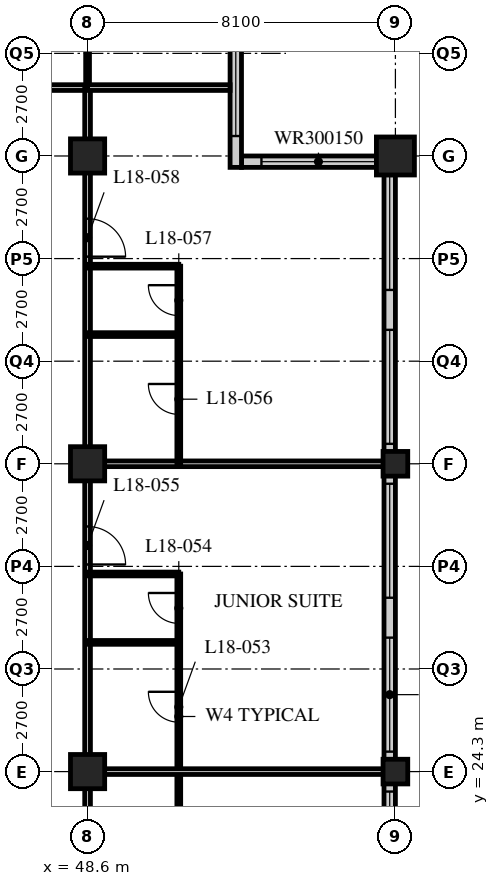
"""IFC4 building model, lengths in metres.
Left out: names, types, materials, properties, quantities, classifications, styles, units other than length and angle.
Written with IfcOpenShell. Run it as: python <this file> out.ifc"""

import sys

from ifc_helpers import new_model, si_unit, direction, frame, frame_2d, origin, origin_2d, place, context, subcontext, project, spatial, rectangle, hollow_rectangle, extrude, element, fill, save


model = new_model("IFC4")
c1 = context("Model", 3, precision=1e-05, world=origin(), true_north=direction((0.0, 1.0)))
c2 = subcontext(c1, "Body", "Model", "MODEL_VIEW")
j1 = project(units=[si_unit("LENGTHUNIT", "METRE"), si_unit("PLANEANGLEUNIT", "RADIAN")], contexts=[c1])
p1 = place(None, origin())
s1 = spatial("IfcSite", under=j1, at=p1, CompositionType="ELEMENT")
p2 = place(p1, origin())
s2 = spatial("IfcBuilding", under=s1, at=p2, CompositionType="ELEMENT")
p3 = place(p2, frame((0.0, 0.0, 73.8)))
s3 = spatial("IfcBuildingStorey", under=s2, at=p3, CompositionType="ELEMENT", Elevation=73.8)
for number, where, z_axis, x_axis in (
    (1, (48.6, 24.3, 0.0), (0.0, 0.0, 1.0), (1.0, 0.0, 0.0)),
    (2, (48.6, 32.4, 0.0), (0.0, 0.0, 1.0), (1.0, 0.0, 0.0)),
    (3, (48.6, 40.5, 0.0), (0.0, 0.0, 1.0), (1.0, 0.0, 0.0)),
):
    element("IfcColumn", number, at=place(p3, frame(where, z_axis=z_axis, x_axis=x_axis)), inside=s3, PredefinedType="COLUMN", context=c2, shape_type="SweptSolid", body=[
        extrude(hollow_rectangle(XDim=0.9, YDim=0.9, WallThickness=0.09, at=origin_2d()), origin(), (0.0, 0.0, 1.0), 3.4),
    ])
for number, where, z_axis, x_axis in (
    (4, (56.7, 24.3, 0.0), (0.0, 0.0, 1.0), (1.0, 0.0, 0.0)),
    (5, (56.7, 32.4, 0.0), (0.0, 0.0, 1.0), (1.0, 0.0, 0.0)),
):
    element("IfcColumn", number, at=place(p3, frame(where, z_axis=z_axis, x_axis=x_axis)), inside=s3, PredefinedType="COLUMN", context=c2, shape_type="SweptSolid", body=[
        extrude(hollow_rectangle(XDim=0.65, YDim=0.65, WallThickness=0.05, at=origin_2d()), origin(), (0.0, 0.0, 1.0), 3.4),
    ])
p4 = place(p3, frame((56.7, 40.5, 0.0), z_axis=(0.0, 0.0, 1.0), x_axis=(1.0, 0.0, 0.0)))
e6 = element("IfcColumn", 6, at=p4, inside=s3, PredefinedType="COLUMN", context=c2, shape_type="SweptSolid", body=[
    extrude(hollow_rectangle(XDim=1.0, YDim=1.0, WallThickness=0.1, at=origin_2d()), origin(), (0.0, 0.0, 1.0), 3.4),
])
p5 = place(p3, frame((56.55, 8.4, 0.0), z_axis=(0.0, 0.0, 1.0), x_axis=(0.0, 1.0, 0.0)))
e7 = element("IfcWall", 7, at=p5, inside=s3, PredefinedType="SOLIDWALL", context=c2, shape_type="SweptSolid", body=[
    extrude(rectangle(XDim=32.1, YDim=0.3, at=frame_2d((16.05, 0.0))), origin(), (0.0, 0.0, 1.0), 3.19),
])
p6 = place(p5, frame((0.225, 0.0, 0.9)))
e8 = element("IfcOpeningElement", 8, at=p6, cuts=e7, PredefinedType="OPENING", context=c2, shape_type="SweptSolid", body=[
    extrude(rectangle(XDim=3.0, YDim=2.0, at=frame_2d((1.5, 1.0))), frame((0.0, 0.16, 0.0), z_axis=(0.0, -1.0, 0.0), x_axis=(1.0, 0.0, 0.0)), (0.0, 0.0, 1.0), 0.32),
])
p7 = place(p5, frame((4.275, 0.0, 0.9)))
e9 = element("IfcOpeningElement", 9, at=p7, cuts=e7, PredefinedType="OPENING", context=c2, shape_type="SweptSolid", body=[
    extrude(rectangle(XDim=3.0, YDim=2.0, at=frame_2d((1.5, 1.0))), frame((0.0, 0.16, 0.0), z_axis=(0.0, -1.0, 0.0), x_axis=(1.0, 0.0, 0.0)), (0.0, 0.0, 1.0), 0.32),
])
p8 = place(p5, frame((8.325, 0.0, 0.9)))
e10 = element("IfcOpeningElement", 10, at=p8, cuts=e7, PredefinedType="OPENING", context=c2, shape_type="SweptSolid", body=[
    extrude(rectangle(XDim=3.0, YDim=2.0, at=frame_2d((1.5, 1.0))), frame((0.0, 0.16, 0.0), z_axis=(0.0, -1.0, 0.0), x_axis=(1.0, 0.0, 0.0)), (0.0, 0.0, 1.0), 0.32),
])
p9 = place(p5, frame((12.375, 0.0, 0.9)))
e11 = element("IfcOpeningElement", 11, at=p9, cuts=e7, PredefinedType="OPENING", context=c2, shape_type="SweptSolid", body=[
    extrude(rectangle(XDim=3.0, YDim=2.0, at=frame_2d((1.5, 1.0))), frame((0.0, 0.16, 0.0), z_axis=(0.0, -1.0, 0.0), x_axis=(1.0, 0.0, 0.0)), (0.0, 0.0, 1.0), 0.32),
])
p10 = place(p5, frame((16.425, 0.0, 0.9)))
e12 = element("IfcOpeningElement", 12, at=p10, cuts=e7, PredefinedType="OPENING", context=c2, shape_type="SweptSolid", body=[
    extrude(rectangle(XDim=3.0, YDim=2.0, at=frame_2d((1.5, 1.0))), frame((0.0, 0.16, 0.0), z_axis=(0.0, -1.0, 0.0), x_axis=(1.0, 0.0, 0.0)), (0.0, 0.0, 1.0), 0.32),
])
p11 = place(p5, frame((20.475, 0.0, 0.9)))
e13 = element("IfcOpeningElement", 13, at=p11, cuts=e7, PredefinedType="OPENING", context=c2, shape_type="SweptSolid", body=[
    extrude(rectangle(XDim=3.0, YDim=2.0, at=frame_2d((1.5, 1.0))), frame((0.0, 0.16, 0.0), z_axis=(0.0, -1.0, 0.0), x_axis=(1.0, 0.0, 0.0)), (0.0, 0.0, 1.0), 0.32),
])
p12 = place(p5, frame((24.525, 0.0, 0.9)))
e14 = element("IfcOpeningElement", 14, at=p12, cuts=e7, PredefinedType="OPENING", context=c2, shape_type="SweptSolid", body=[
    extrude(rectangle(XDim=3.0, YDim=2.0, at=frame_2d((1.5, 1.0))), frame((0.0, 0.16, 0.0), z_axis=(0.0, -1.0, 0.0), x_axis=(1.0, 0.0, 0.0)), (0.0, 0.0, 1.0), 0.32),
])
p13 = place(p5, frame((28.575, 0.0, 0.9)))
e15 = element("IfcOpeningElement", 15, at=p13, cuts=e7, PredefinedType="OPENING", context=c2, shape_type="SweptSolid", body=[
    extrude(rectangle(XDim=3.0, YDim=2.0, at=frame_2d((1.5, 1.0))), frame((0.0, 0.16, 0.0), z_axis=(0.0, -1.0, 0.0), x_axis=(1.0, 0.0, 0.0)), (0.0, 0.0, 1.0), 0.32),
])
p14 = place(p3, frame((56.4, 40.35, 0.0), z_axis=(0.0, 0.0, 1.0), x_axis=(-1.0, 0.0, 0.0)))
e16 = element("IfcWall", 16, at=p14, inside=s3, PredefinedType="SOLIDWALL", context=c2, shape_type="SweptSolid", body=[
    extrude(rectangle(XDim=3.75, YDim=0.3, at=frame_2d((1.875, 0.0))), origin(), (0.0, 0.0, 1.0), 3.19),
])
p15 = place(p14, frame((0.225, 0.0, 0.9)))
e17 = element("IfcOpeningElement", 17, at=p15, cuts=e16, PredefinedType="OPENING", context=c2, shape_type="SweptSolid", body=[
    extrude(rectangle(XDim=3.0, YDim=1.5, at=frame_2d((1.5, 0.75))), frame((0.0, 0.16, 0.0), z_axis=(0.0, -1.0, 0.0), x_axis=(1.0, 0.0, 0.0)), (0.0, 0.0, 1.0), 0.32),
])
p16 = place(p3, frame((52.5, 40.2, 0.0), z_axis=(0.0, 0.0, 1.0), x_axis=(0.0, 1.0, 0.0)))
e18 = element("IfcWall", 18, at=p16, inside=s3, PredefinedType="SOLIDWALL", context=c2, shape_type="SweptSolid", body=[
    extrude(rectangle(XDim=4.35, YDim=0.3, at=frame_2d((2.175, 0.0))), origin(), (0.0, 0.0, 1.0), 3.19),
])
p17 = place(p16, frame((0.825, 0.0, 0.9)))
e19 = element("IfcOpeningElement", 19, at=p17, cuts=e18, PredefinedType="OPENING", context=c2, shape_type="SweptSolid", body=[
    extrude(rectangle(XDim=3.0, YDim=1.5, at=frame_2d((1.5, 0.75))), frame((0.0, 0.16, 0.0), z_axis=(0.0, -1.0, 0.0), x_axis=(1.0, 0.0, 0.0)), (0.0, 0.0, 1.0), 0.32),
])
p18 = place(p3, frame((12.15, 42.3, 0.0), z_axis=(0.0, 0.0, 1.0), x_axis=(1.0, 0.0, 0.0)))
e20 = element("IfcWall", 20, at=p18, inside=s3, PredefinedType="PARTITIONING", context=c2, shape_type="SweptSolid", body=[
    extrude(rectangle(XDim=36.45, YDim=0.15, at=frame_2d((18.225, 0.0))), origin(), (0.0, 0.0, 1.0), 3.19),
])
p19 = place(p18, frame((9.5, 0.0, 0.0)))
e21 = element("IfcOpeningElement", 21, at=p19, cuts=e20, PredefinedType="OPENING", context=c2, shape_type="SweptSolid", body=[
    extrude(rectangle(XDim=1.0, YDim=2.1, at=frame_2d((0.5, 1.05))), frame((0.0, 0.085, 0.0), z_axis=(0.0, -1.0, 0.0), x_axis=(1.0, 0.0, 0.0)), (0.0, 0.0, 1.0), 0.17),
])
p20 = place(p18, frame((17.6, 0.0, 0.0)))
e22 = element("IfcOpeningElement", 22, at=p20, cuts=e20, PredefinedType="OPENING", context=c2, shape_type="SweptSolid", body=[
    extrude(rectangle(XDim=1.0, YDim=2.1, at=frame_2d((0.5, 1.05))), frame((0.0, 0.085, 0.0), z_axis=(0.0, -1.0, 0.0), x_axis=(1.0, 0.0, 0.0)), (0.0, 0.0, 1.0), 0.17),
])
p21 = place(p18, frame((22.7, 0.0, 0.0)))
e23 = element("IfcOpeningElement", 23, at=p21, cuts=e20, PredefinedType="OPENING", context=c2, shape_type="SweptSolid", body=[
    extrude(rectangle(XDim=1.0, YDim=2.1, at=frame_2d((0.5, 1.05))), frame((0.0, 0.085, 0.0), z_axis=(0.0, -1.0, 0.0), x_axis=(1.0, 0.0, 0.0)), (0.0, 0.0, 1.0), 0.17),
])
p22 = place(p18, frame((26.75, 0.0, 0.0)))
e24 = element("IfcOpeningElement", 24, at=p22, cuts=e20, PredefinedType="OPENING", context=c2, shape_type="SweptSolid", body=[
    extrude(rectangle(XDim=1.0, YDim=2.1, at=frame_2d((0.5, 1.05))), frame((0.0, 0.085, 0.0), z_axis=(0.0, -1.0, 0.0), x_axis=(1.0, 0.0, 0.0)), (0.0, 0.0, 1.0), 0.17),
])
p23 = place(p18, frame((30.8, 0.0, 0.0)))
e25 = element("IfcOpeningElement", 25, at=p23, cuts=e20, PredefinedType="OPENING", context=c2, shape_type="SweptSolid", body=[
    extrude(rectangle(XDim=1.0, YDim=2.1, at=frame_2d((0.5, 1.05))), frame((0.0, 0.085, 0.0), z_axis=(0.0, -1.0, 0.0), x_axis=(1.0, 0.0, 0.0)), (0.0, 0.0, 1.0), 0.17),
])
p24 = place(p18, frame((32.825, 0.0, 0.0)))
e26 = element("IfcOpeningElement", 26, at=p24, cuts=e20, PredefinedType="OPENING", context=c2, shape_type="SweptSolid", body=[
    extrude(rectangle(XDim=1.0, YDim=2.1, at=frame_2d((0.5, 1.05))), frame((0.0, 0.085, 0.0), z_axis=(0.0, -1.0, 0.0), x_axis=(1.0, 0.0, 0.0)), (0.0, 0.0, 1.0), 0.17),
])
p25 = place(p18, frame((2.625, 0.0, 0.0)))
e27 = element("IfcOpeningElement", 27, at=p25, cuts=e20, PredefinedType="OPENING", context=c2, shape_type="SweptSolid", body=[
    extrude(rectangle(XDim=1.0, YDim=2.1, at=frame_2d((0.5, 1.05))), frame((0.0, 0.085, 0.0), z_axis=(0.0, -1.0, 0.0), x_axis=(1.0, 0.0, 0.0)), (0.0, 0.0, 1.0), 0.17),
])
p26 = place(p3, frame((48.6, 16.2, 0.0), z_axis=(0.0, 0.0, 1.0), x_axis=(0.0, 1.0, 0.0)))
e28 = element("IfcWall", 28, at=p26, inside=s3, PredefinedType="PARTITIONING", context=c2, shape_type="SweptSolid", body=[
    extrude(rectangle(XDim=26.1, YDim=0.15, at=frame_2d((13.05, 0.0))), origin(), (0.0, 0.0, 1.0), 2.578),
])
p27 = place(p26, frame((2.75, 0.0, 0.0)))
e29 = element("IfcOpeningElement", 29, at=p27, cuts=e28, PredefinedType="OPENING", context=c2, shape_type="SweptSolid", body=[
    extrude(rectangle(XDim=1.0, YDim=2.1, at=frame_2d((0.5, 1.05))), frame((0.0, 0.085, 0.0), z_axis=(0.0, -1.0, 0.0), x_axis=(1.0, 0.0, 0.0)), (0.0, 0.0, 1.0), 0.17),
])
p28 = place(p26, frame((4.65, 0.0, 0.0)))
e30 = element("IfcOpeningElement", 30, at=p28, cuts=e28, PredefinedType="OPENING", context=c2, shape_type="SweptSolid", body=[
    extrude(rectangle(XDim=1.0, YDim=2.1, at=frame_2d((0.5, 1.05))), frame((0.0, 0.085, 0.0), z_axis=(0.0, -1.0, 0.0), x_axis=(1.0, 0.0, 0.0)), (0.0, 0.0, 1.0), 0.17),
])
p29 = place(p26, frame((13.55, 0.0, 0.0)))
e31 = element("IfcOpeningElement", 31, at=p29, cuts=e28, PredefinedType="OPENING", context=c2, shape_type="SweptSolid", body=[
    extrude(rectangle(XDim=1.0, YDim=2.1, at=frame_2d((0.5, 1.05))), frame((0.0, 0.085, 0.0), z_axis=(0.0, -1.0, 0.0), x_axis=(1.0, 0.0, 0.0)), (0.0, 0.0, 1.0), 0.17),
])
p30 = place(p26, frame((21.65, 0.0, 0.0)))
e32 = element("IfcOpeningElement", 32, at=p30, cuts=e28, PredefinedType="OPENING", context=c2, shape_type="SweptSolid", body=[
    extrude(rectangle(XDim=1.0, YDim=2.1, at=frame_2d((0.5, 1.05))), frame((0.0, 0.085, 0.0), z_axis=(0.0, -1.0, 0.0), x_axis=(1.0, 0.0, 0.0)), (0.0, 0.0, 1.0), 0.17),
])
p31 = place(p3, frame((51.0, 22.0, 0.0), z_axis=(0.0, 0.0, 1.0), x_axis=(0.0, 1.0, 0.0)))
e33 = element("IfcWall", 33, at=p31, inside=s3, PredefinedType="PARTITIONING", context=c2, shape_type="SweptSolid", body=[
    extrude(rectangle(XDim=7.5, YDim=0.1, at=frame_2d((3.75, 0.0))), origin(), (0.0, 0.0, 1.0), 3.19),
])
p32 = place(p31, frame((3.6, 0.0, 0.0)))
e34 = element("IfcOpeningElement", 34, at=p32, cuts=e33, PredefinedType="OPENING", context=c2, shape_type="SweptSolid", body=[
    extrude(rectangle(XDim=0.8, YDim=2.1, at=frame_2d((0.4, 1.05))), frame((0.0, 0.06, 0.0), z_axis=(0.0, -1.0, 0.0), x_axis=(1.0, 0.0, 0.0)), (0.0, 0.0, 1.0), 0.12),
])
p33 = place(p31, frame((6.2, 0.0, 0.0)))
e35 = element("IfcOpeningElement", 35, at=p33, cuts=e33, PredefinedType="OPENING", context=c2, shape_type="SweptSolid", body=[
    extrude(rectangle(XDim=0.8, YDim=2.1, at=frame_2d((0.4, 1.05))), frame((0.0, 0.06, 0.0), z_axis=(0.0, -1.0, 0.0), x_axis=(1.0, 0.0, 0.0)), (0.0, 0.0, 1.0), 0.12),
])
p34 = place(p3, frame((48.6, 24.3, 0.0), z_axis=(0.0, 0.0, 1.0), x_axis=(1.0, 0.0, 0.0)))
e36 = element("IfcWall", 36, at=p34, inside=s3, PredefinedType="PARTITIONING", context=c2, shape_type="SweptSolid", body=[
    extrude(rectangle(XDim=7.8, YDim=0.15, at=frame_2d((3.9, 0.0))), origin(), (0.0, 0.0, 1.0), 2.578),
])
for number, where, z_axis, x_axis in (
    (37, (48.6, 27.7, 0.0), (0.0, 0.0, 1.0), (1.0, 0.0, 0.0)),
    (38, (48.6, 29.5, 0.0), (0.0, 0.0, 1.0), (1.0, 0.0, 0.0)),
):
    element("IfcWall", number, at=place(p3, frame(where, z_axis=z_axis, x_axis=x_axis)), inside=s3, PredefinedType="PARTITIONING", context=c2, shape_type="SweptSolid", body=[
        extrude(rectangle(XDim=2.4, YDim=0.1, at=frame_2d((1.2, 0.0))), origin(), (0.0, 0.0, 1.0), 3.19),
    ])
p35 = place(p3, frame((48.6, 32.4, 0.0), z_axis=(0.0, 0.0, 1.0), x_axis=(1.0, 0.0, 0.0)))
e39 = element("IfcWall", 39, at=p35, inside=s3, PredefinedType="PARTITIONING", context=c2, shape_type="SweptSolid", body=[
    extrude(rectangle(XDim=7.8, YDim=0.15, at=frame_2d((3.9, 0.0))), origin(), (0.0, 0.0, 1.0), 2.578),
])
p36 = place(p3, frame((51.0, 32.4, 0.0), z_axis=(0.0, 0.0, 1.0), x_axis=(0.0, 1.0, 0.0)))
e40 = element("IfcWall", 40, at=p36, inside=s3, PredefinedType="PARTITIONING", context=c2, shape_type="SweptSolid", body=[
    extrude(rectangle(XDim=5.2, YDim=0.1, at=frame_2d((2.6, 0.0))), origin(), (0.0, 0.0, 1.0), 3.19),
])
p37 = place(p36, frame((1.3, 0.0, 0.0)))
e41 = element("IfcOpeningElement", 41, at=p37, cuts=e40, PredefinedType="OPENING", context=c2, shape_type="SweptSolid", body=[
    extrude(rectangle(XDim=0.8, YDim=2.1, at=frame_2d((0.4, 1.05))), frame((0.0, 0.06, 0.0), z_axis=(0.0, -1.0, 0.0), x_axis=(1.0, 0.0, 0.0)), (0.0, 0.0, 1.0), 0.12),
])
p38 = place(p36, frame((3.9, 0.0, 0.0)))
e42 = element("IfcOpeningElement", 42, at=p38, cuts=e40, PredefinedType="OPENING", context=c2, shape_type="SweptSolid", body=[
    extrude(rectangle(XDim=0.8, YDim=2.1, at=frame_2d((0.4, 1.05))), frame((0.0, 0.06, 0.0), z_axis=(0.0, -1.0, 0.0), x_axis=(1.0, 0.0, 0.0)), (0.0, 0.0, 1.0), 0.12),
])
for number, where, z_axis, x_axis in (
    (43, (48.6, 35.8, 0.0), (0.0, 0.0, 1.0), (1.0, 0.0, 0.0)),
    (44, (48.6, 37.6, 0.0), (0.0, 0.0, 1.0), (1.0, 0.0, 0.0)),
):
    element("IfcWall", number, at=place(p3, frame(where, z_axis=z_axis, x_axis=x_axis)), inside=s3, PredefinedType="PARTITIONING", context=c2, shape_type="SweptSolid", body=[
        extrude(rectangle(XDim=2.4, YDim=0.1, at=frame_2d((1.2, 0.0))), origin(), (0.0, 0.0, 1.0), 3.19),
    ])
p39 = place(p3, frame((48.6, 42.3, 0.0), z_axis=(0.0, 0.0, 1.0), x_axis=(0.0, 1.0, 0.0)))
e45 = element("IfcWall", 45, at=p39, inside=s3, PredefinedType="PARTITIONING", context=c2, shape_type="SweptSolid", body=[
    extrude(rectangle(XDim=1.95, YDim=0.1, at=frame_2d((0.975, 0.0))), origin(), (0.0, 0.0, 1.0), 2.578),
])
p40 = place(p3, frame((48.6, 42.3, 0.0), z_axis=(0.0, 0.0, 1.0), x_axis=(1.0, 0.0, 0.0)))
e46 = element("IfcWall", 46, at=p40, inside=s3, PredefinedType="PARTITIONING", context=c2, shape_type="SweptSolid", body=[
    extrude(rectangle(XDim=3.75, YDim=0.15, at=frame_2d((1.875, 0.0))), origin(), (0.0, 0.0, 1.0), 3.19),
])
p41 = place(p9, origin())
e47 = element("IfcWindow", 47, at=p41, inside=s3, PartitioningType="SINGLE_PANEL", PredefinedType="WINDOW", context=c2, shape_type="SweptSolid", body=[
    extrude(rectangle(XDim=3.0, YDim=2.0, at=frame_2d((1.5, 1.0))), frame((0.0, 0.03, 0.0), z_axis=(0.0, -1.0, 0.0), x_axis=(1.0, 0.0, 0.0)), (0.0, 0.0, 1.0), 0.06),
])
fill(e11, e47)
p42 = place(p10, origin())
e48 = element("IfcWindow", 48, at=p42, inside=s3, PartitioningType="SINGLE_PANEL", PredefinedType="WINDOW", context=c2, shape_type="SweptSolid", body=[
    extrude(rectangle(XDim=3.0, YDim=2.0, at=frame_2d((1.5, 1.0))), frame((0.0, 0.03, 0.0), z_axis=(0.0, -1.0, 0.0), x_axis=(1.0, 0.0, 0.0)), (0.0, 0.0, 1.0), 0.06),
])
fill(e12, e48)
p43 = place(p11, origin())
e49 = element("IfcWindow", 49, at=p43, inside=s3, PartitioningType="SINGLE_PANEL", PredefinedType="WINDOW", context=c2, shape_type="SweptSolid", body=[
    extrude(rectangle(XDim=3.0, YDim=2.0, at=frame_2d((1.5, 1.0))), frame((0.0, 0.03, 0.0), z_axis=(0.0, -1.0, 0.0), x_axis=(1.0, 0.0, 0.0)), (0.0, 0.0, 1.0), 0.06),
])
fill(e13, e49)
p44 = place(p12, origin())
e50 = element("IfcWindow", 50, at=p44, inside=s3, PartitioningType="SINGLE_PANEL", PredefinedType="WINDOW", context=c2, shape_type="SweptSolid", body=[
    extrude(rectangle(XDim=3.0, YDim=2.0, at=frame_2d((1.5, 1.0))), frame((0.0, 0.03, 0.0), z_axis=(0.0, -1.0, 0.0), x_axis=(1.0, 0.0, 0.0)), (0.0, 0.0, 1.0), 0.06),
])
fill(e14, e50)
p45 = place(p13, origin())
e51 = element("IfcWindow", 51, at=p45, inside=s3, PartitioningType="SINGLE_PANEL", PredefinedType="WINDOW", context=c2, shape_type="SweptSolid", body=[
    extrude(rectangle(XDim=3.0, YDim=2.0, at=frame_2d((1.5, 1.0))), frame((0.0, 0.03, 0.0), z_axis=(0.0, -1.0, 0.0), x_axis=(1.0, 0.0, 0.0)), (0.0, 0.0, 1.0), 0.06),
])
fill(e15, e51)
p46 = place(p15, origin())
e52 = element("IfcWindow", 52, at=p46, inside=s3, PartitioningType="SINGLE_PANEL", PredefinedType="WINDOW", context=c2, shape_type="SweptSolid", body=[
    extrude(rectangle(XDim=3.0, YDim=1.5, at=frame_2d((1.5, 0.75))), frame((0.0, 0.03, 0.0), z_axis=(0.0, -1.0, 0.0), x_axis=(1.0, 0.0, 0.0)), (0.0, 0.0, 1.0), 0.06),
])
fill(e17, e52)
p47 = place(p17, origin())
e53 = element("IfcWindow", 53, at=p47, inside=s3, PartitioningType="SINGLE_PANEL", PredefinedType="WINDOW", context=c2, shape_type="SweptSolid", body=[
    extrude(rectangle(XDim=3.0, YDim=1.5, at=frame_2d((1.5, 0.75))), frame((0.0, 0.03, 0.0), z_axis=(0.0, -1.0, 0.0), x_axis=(1.0, 0.0, 0.0)), (0.0, 0.0, 1.0), 0.06),
])
fill(e19, e53)
p48 = place(p32, origin())
e54 = element("IfcDoor", 54, at=p48, inside=s3, OperationType="SINGLE_SWING_RIGHT", PredefinedType="DOOR", context=c2, shape_type="SweptSolid", body=[
    extrude(rectangle(XDim=0.8, YDim=2.1, at=frame_2d((0.4, 1.05))), frame((0.0, 0.025, 0.0), z_axis=(0.0, -1.0, 0.0), x_axis=(1.0, 0.0, 0.0)), (0.0, 0.0, 1.0), 0.05),
])
fill(e34, e54)
p49 = place(p33, origin())
e55 = element("IfcDoor", 55, at=p49, inside=s3, OperationType="SINGLE_SWING_RIGHT", PredefinedType="DOOR", context=c2, shape_type="SweptSolid", body=[
    extrude(rectangle(XDim=0.8, YDim=2.1, at=frame_2d((0.4, 1.05))), frame((0.0, 0.025, 0.0), z_axis=(0.0, -1.0, 0.0), x_axis=(1.0, 0.0, 0.0)), (0.0, 0.0, 1.0), 0.05),
])
fill(e35, e55)
p50 = place(p29, origin())
e56 = element("IfcDoor", 56, at=p50, inside=s3, OperationType="SINGLE_SWING_RIGHT", PredefinedType="DOOR", context=c2, shape_type="SweptSolid", body=[
    extrude(rectangle(XDim=1.0, YDim=2.1, at=frame_2d((0.5, 1.05))), frame((0.0, 0.025, 0.0), z_axis=(0.0, -1.0, 0.0), x_axis=(1.0, 0.0, 0.0)), (0.0, 0.0, 1.0), 0.05),
])
fill(e31, e56)
p51 = place(p37, origin())
e57 = element("IfcDoor", 57, at=p51, inside=s3, OperationType="SINGLE_SWING_RIGHT", PredefinedType="DOOR", context=c2, shape_type="SweptSolid", body=[
    extrude(rectangle(XDim=0.8, YDim=2.1, at=frame_2d((0.4, 1.05))), frame((0.0, 0.025, 0.0), z_axis=(0.0, -1.0, 0.0), x_axis=(1.0, 0.0, 0.0)), (0.0, 0.0, 1.0), 0.05),
])
fill(e41, e57)
p52 = place(p38, origin())
e58 = element("IfcDoor", 58, at=p52, inside=s3, OperationType="SINGLE_SWING_RIGHT", PredefinedType="DOOR", context=c2, shape_type="SweptSolid", body=[
    extrude(rectangle(XDim=0.8, YDim=2.1, at=frame_2d((0.4, 1.05))), frame((0.0, 0.025, 0.0), z_axis=(0.0, -1.0, 0.0), x_axis=(1.0, 0.0, 0.0)), (0.0, 0.0, 1.0), 0.05),
])
fill(e42, e58)
p53 = place(p30, origin())
e59 = element("IfcDoor", 59, at=p53, inside=s3, OperationType="SINGLE_SWING_RIGHT", PredefinedType="DOOR", context=c2, shape_type="SweptSolid", body=[
    extrude(rectangle(XDim=1.0, YDim=2.1, at=frame_2d((0.5, 1.05))), frame((0.0, 0.025, 0.0), z_axis=(0.0, -1.0, 0.0), x_axis=(1.0, 0.0, 0.0)), (0.0, 0.0, 1.0), 0.05),
])
fill(e32, e59)
save(model, sys.argv[1])
